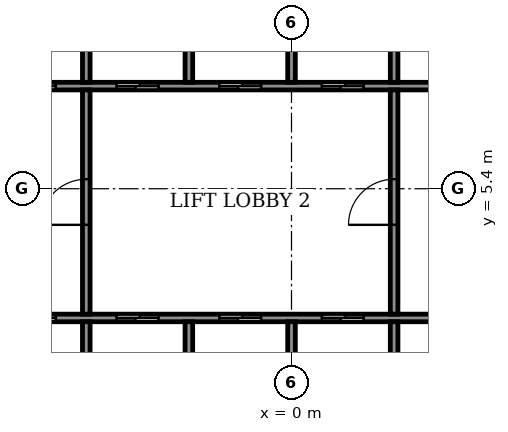
"""IFC4 building model, lengths in metres.
Left out: names, types, materials, properties, quantities, classifications, styles, units other than length and angle.
Written with IfcOpenShell. Run it as: python <this file> out.ifc"""

import sys

from ifc_helpers import new_model, si_unit, direction, frame, frame_2d, origin, place, context, subcontext, project, spatial, rectangle, extrude, element, fill, save


model = new_model("IFC4")
c1 = context("Model", 3, precision=1e-05, world=origin(), true_north=direction((0.0, 1.0)))
c2 = subcontext(c1, "Body", "Model", "MODEL_VIEW")
j1 = project(units=[si_unit("LENGTHUNIT", "METRE"), si_unit("PLANEANGLEUNIT", "RADIAN")], contexts=[c1])
p1 = place(None, origin())
s1 = spatial("IfcSite", under=j1, at=p1, CompositionType="ELEMENT")
p2 = place(p1, origin())
s2 = spatial("IfcBuilding", under=s1, at=p2, CompositionType="ELEMENT")
p3 = place(p2, frame((0.0, 0.0, 29.5)))
s3 = spatial("IfcBuildingStorey", under=s2, at=p3, CompositionType="ELEMENT", Elevation=29.5)
p4 = place(p3, frame((-10.9, 2.0, 0.0), z_axis=(0.0, 0.0, 1.0), x_axis=(1.0, 0.0, 0.0)))
e1 = element("IfcWall", 1, at=p4, inside=s3, PredefinedType="SHEAR", context=c2, shape_type="SweptSolid", body=[
    extrude(rectangle(XDim=21.8, YDim=0.2, at=frame_2d((10.9, 0.0))), origin(), (0.0, 0.0, 1.0), 4.05),
])
p5 = place(p4, frame((0.9, 0.0, 0.0)))
e2 = element("IfcOpeningElement", 2, at=p5, cuts=e1, PredefinedType="OPENING", context=c2, shape_type="SweptSolid", body=[
    extrude(rectangle(XDim=1.1, YDim=2.1, at=frame_2d((0.55, 1.05))), frame((0.0, 0.11, 0.0), z_axis=(0.0, -1.0, 0.0), x_axis=(1.0, 0.0, 0.0)), (0.0, 0.0, 1.0), 0.22),
])
p6 = place(p4, frame((3.6, 0.0, 0.0)))
e3 = element("IfcOpeningElement", 3, at=p6, cuts=e1, PredefinedType="OPENING", context=c2, shape_type="SweptSolid", body=[
    extrude(rectangle(XDim=1.1, YDim=2.1, at=frame_2d((0.55, 1.05))), frame((0.0, 0.11, 0.0), z_axis=(0.0, -1.0, 0.0), x_axis=(1.0, 0.0, 0.0)), (0.0, 0.0, 1.0), 0.22),
])
p7 = place(p4, frame((6.3, 0.0, 0.0)))
e4 = element("IfcOpeningElement", 4, at=p7, cuts=e1, PredefinedType="OPENING", context=c2, shape_type="SweptSolid", body=[
    extrude(rectangle(XDim=1.1, YDim=2.1, at=frame_2d((0.55, 1.05))), frame((0.0, 0.11, 0.0), z_axis=(0.0, -1.0, 0.0), x_axis=(1.0, 0.0, 0.0)), (0.0, 0.0, 1.0), 0.22),
])
p8 = place(p4, frame((9.0, 0.0, 0.0)))
e5 = element("IfcOpeningElement", 5, at=p8, cuts=e1, PredefinedType="OPENING", context=c2, shape_type="SweptSolid", body=[
    extrude(rectangle(XDim=1.1, YDim=2.1, at=frame_2d((0.55, 1.05))), frame((0.0, 0.11, 0.0), z_axis=(0.0, -1.0, 0.0), x_axis=(1.0, 0.0, 0.0)), (0.0, 0.0, 1.0), 0.22),
])
p9 = place(p4, frame((11.7, 0.0, 0.0)))
e6 = element("IfcOpeningElement", 6, at=p9, cuts=e1, PredefinedType="OPENING", context=c2, shape_type="SweptSolid", body=[
    extrude(rectangle(XDim=1.1, YDim=2.1, at=frame_2d((0.55, 1.05))), frame((0.0, 0.11, 0.0), z_axis=(0.0, -1.0, 0.0), x_axis=(1.0, 0.0, 0.0)), (0.0, 0.0, 1.0), 0.22),
])
p10 = place(p4, frame((15.175, 0.0, 0.0)))
e7 = element("IfcOpeningElement", 7, at=p10, cuts=e1, PredefinedType="OPENING", context=c2, shape_type="SweptSolid", body=[
    extrude(rectangle(XDim=0.9, YDim=2.1, at=frame_2d((0.45, 1.05))), frame((0.0, 0.11, 0.0), z_axis=(0.0, -1.0, 0.0), x_axis=(1.0, 0.0, 0.0)), (0.0, 0.0, 1.0), 0.22),
])
p11 = place(p4, frame((19.225, 0.0, 0.0)))
e8 = element("IfcOpeningElement", 8, at=p11, cuts=e1, PredefinedType="OPENING", context=c2, shape_type="SweptSolid", body=[
    extrude(rectangle(XDim=0.9, YDim=2.1, at=frame_2d((0.45, 1.05))), frame((0.0, 0.11, 0.0), z_axis=(0.0, -1.0, 0.0), x_axis=(1.0, 0.0, 0.0)), (0.0, 0.0, 1.0), 0.22),
])
p12 = place(p3, frame((-10.9, 8.1, 0.0), z_axis=(0.0, 0.0, 1.0), x_axis=(1.0, 0.0, 0.0)))
e9 = element("IfcWall", 9, at=p12, inside=s3, PredefinedType="SHEAR", context=c2, shape_type="SweptSolid", body=[
    extrude(rectangle(XDim=21.8, YDim=0.2, at=frame_2d((10.9, 0.0))), origin(), (0.0, 0.0, 1.0), 4.05),
])
p13 = place(p12, frame((0.9, 0.0, 0.0)))
e10 = element("IfcOpeningElement", 10, at=p13, cuts=e9, PredefinedType="OPENING", context=c2, shape_type="SweptSolid", body=[
    extrude(rectangle(XDim=1.1, YDim=2.1, at=frame_2d((0.55, 1.05))), frame((0.0, 0.11, 0.0), z_axis=(0.0, -1.0, 0.0), x_axis=(1.0, 0.0, 0.0)), (0.0, 0.0, 1.0), 0.22),
])
p14 = place(p12, frame((3.6, 0.0, 0.0)))
e11 = element("IfcOpeningElement", 11, at=p14, cuts=e9, PredefinedType="OPENING", context=c2, shape_type="SweptSolid", body=[
    extrude(rectangle(XDim=1.1, YDim=2.1, at=frame_2d((0.55, 1.05))), frame((0.0, 0.11, 0.0), z_axis=(0.0, -1.0, 0.0), x_axis=(1.0, 0.0, 0.0)), (0.0, 0.0, 1.0), 0.22),
])
p15 = place(p12, frame((6.3, 0.0, 0.0)))
e12 = element("IfcOpeningElement", 12, at=p15, cuts=e9, PredefinedType="OPENING", context=c2, shape_type="SweptSolid", body=[
    extrude(rectangle(XDim=1.1, YDim=2.1, at=frame_2d((0.55, 1.05))), frame((0.0, 0.11, 0.0), z_axis=(0.0, -1.0, 0.0), x_axis=(1.0, 0.0, 0.0)), (0.0, 0.0, 1.0), 0.22),
])
p16 = place(p12, frame((9.0, 0.0, 0.0)))
e13 = element("IfcOpeningElement", 13, at=p16, cuts=e9, PredefinedType="OPENING", context=c2, shape_type="SweptSolid", body=[
    extrude(rectangle(XDim=1.1, YDim=2.1, at=frame_2d((0.55, 1.05))), frame((0.0, 0.11, 0.0), z_axis=(0.0, -1.0, 0.0), x_axis=(1.0, 0.0, 0.0)), (0.0, 0.0, 1.0), 0.22),
])
p17 = place(p12, frame((11.7, 0.0, 0.0)))
e14 = element("IfcOpeningElement", 14, at=p17, cuts=e9, PredefinedType="OPENING", context=c2, shape_type="SweptSolid", body=[
    extrude(rectangle(XDim=1.1, YDim=2.1, at=frame_2d((0.55, 1.05))), frame((0.0, 0.11, 0.0), z_axis=(0.0, -1.0, 0.0), x_axis=(1.0, 0.0, 0.0)), (0.0, 0.0, 1.0), 0.22),
])
p18 = place(p12, frame((15.175, 0.0, 0.0)))
e15 = element("IfcOpeningElement", 15, at=p18, cuts=e9, PredefinedType="OPENING", context=c2, shape_type="SweptSolid", body=[
    extrude(rectangle(XDim=0.9, YDim=2.1, at=frame_2d((0.45, 1.05))), frame((0.0, 0.11, 0.0), z_axis=(0.0, -1.0, 0.0), x_axis=(1.0, 0.0, 0.0)), (0.0, 0.0, 1.0), 0.22),
])
p19 = place(p12, frame((19.225, 0.0, 0.0)))
e16 = element("IfcOpeningElement", 16, at=p19, cuts=e9, PredefinedType="OPENING", context=c2, shape_type="SweptSolid", body=[
    extrude(rectangle(XDim=0.9, YDim=2.1, at=frame_2d((0.45, 1.05))), frame((0.0, 0.11, 0.0), z_axis=(0.0, -1.0, 0.0), x_axis=(1.0, 0.0, 0.0)), (0.0, 0.0, 1.0), 0.22),
])
for number, where, z_axis, x_axis in (
    (17, (-5.4, -0.6, 0.0), (0.0, 0.0, 1.0), (0.0, 1.0, 0.0)),
    (18, (-2.7, -0.6, 0.0), (0.0, 0.0, 1.0), (0.0, 1.0, 0.0)),
    (19, (0.0, -0.6, 0.0), (0.0, 0.0, 1.0), (0.0, 1.0, 0.0)),
    (20, (2.7, -0.6, 0.0), (0.0, 0.0, 1.0), (0.0, 1.0, 0.0)),
):
    element("IfcWall", number, at=place(p3, frame(where, z_axis=z_axis, x_axis=x_axis)), inside=s3, PredefinedType="SHEAR", context=c2, shape_type="SweptSolid", body=[
        extrude(rectangle(XDim=2.5, YDim=0.2, at=frame_2d((1.25, 0.0))), origin(), (0.0, 0.0, 1.0), 4.05),
    ])
for number, where, z_axis, x_axis in (
    (21, (-5.4, 8.2, 0.0), (0.0, 0.0, 1.0), (0.0, 1.0, 0.0)),
    (22, (-2.7, 8.2, 0.0), (0.0, 0.0, 1.0), (0.0, 1.0, 0.0)),
    (23, (0.0, 8.2, 0.0), (0.0, 0.0, 1.0), (0.0, 1.0, 0.0)),
    (24, (2.7, 8.2, 0.0), (0.0, 0.0, 1.0), (0.0, 1.0, 0.0)),
):
    element("IfcWall", number, at=place(p3, frame(where, z_axis=z_axis, x_axis=x_axis)), inside=s3, PredefinedType="SHEAR", context=c2, shape_type="SweptSolid", body=[
        extrude(rectangle(XDim=2.6, YDim=0.2, at=frame_2d((1.3, 0.0))), origin(), (0.0, 0.0, 1.0), 4.05),
    ])
p20 = place(p3, frame((-5.4, 2.1, 0.0), z_axis=(0.0, 0.0, 1.0), x_axis=(0.0, 1.0, 0.0)))
e25 = element("IfcWall", 25, at=p20, inside=s3, PredefinedType="STANDARD", context=c2, shape_type="SweptSolid", body=[
    extrude(rectangle(XDim=5.9, YDim=0.2, at=frame_2d((2.95, 0.0))), origin(), (0.0, 0.0, 1.0), 4.05),
])
p21 = place(p20, frame((2.35, 0.0, 0.0)))
e26 = element("IfcOpeningElement", 26, at=p21, cuts=e25, PredefinedType="OPENING", context=c2, shape_type="SweptSolid", body=[
    extrude(rectangle(XDim=1.2, YDim=2.1, at=frame_2d((0.6, 1.05))), frame((0.0, 0.11, 0.0), z_axis=(0.0, -1.0, 0.0), x_axis=(1.0, 0.0, 0.0)), (0.0, 0.0, 1.0), 0.22),
])
p22 = place(p3, frame((2.7, 2.1, 0.0), z_axis=(0.0, 0.0, 1.0), x_axis=(0.0, 1.0, 0.0)))
e27 = element("IfcWall", 27, at=p22, inside=s3, PredefinedType="STANDARD", context=c2, shape_type="SweptSolid", body=[
    extrude(rectangle(XDim=5.9, YDim=0.2, at=frame_2d((2.95, 0.0))), origin(), (0.0, 0.0, 1.0), 4.05),
])
p23 = place(p22, frame((2.35, 0.0, 0.0)))
e28 = element("IfcOpeningElement", 28, at=p23, cuts=e27, PredefinedType="OPENING", context=c2, shape_type="SweptSolid", body=[
    extrude(rectangle(XDim=1.2, YDim=2.1, at=frame_2d((0.6, 1.05))), frame((0.0, 0.11, 0.0), z_axis=(0.0, -1.0, 0.0), x_axis=(1.0, 0.0, 0.0)), (0.0, 0.0, 1.0), 0.22),
])
p24 = place(p6, origin())
e29 = element("IfcDoor", 29, at=p24, inside=s3, OperationType="SLIDING_TO_LEFT", PredefinedType="DOOR", context=c2, shape_type="SweptSolid", body=[
    extrude(rectangle(XDim=1.1, YDim=2.1, at=frame_2d((0.55, 1.05))), frame((0.0, 0.025, 0.0), z_axis=(0.0, -1.0, 0.0), x_axis=(1.0, 0.0, 0.0)), (0.0, 0.0, 1.0), 0.05),
])
fill(e3, e29)
p25 = place(p7, origin())
e30 = element("IfcDoor", 30, at=p25, inside=s3, OperationType="SLIDING_TO_LEFT", PredefinedType="DOOR", context=c2, shape_type="SweptSolid", body=[
    extrude(rectangle(XDim=1.1, YDim=2.1, at=frame_2d((0.55, 1.05))), frame((0.0, 0.025, 0.0), z_axis=(0.0, -1.0, 0.0), x_axis=(1.0, 0.0, 0.0)), (0.0, 0.0, 1.0), 0.05),
])
fill(e4, e30)
p26 = place(p8, origin())
e31 = element("IfcDoor", 31, at=p26, inside=s3, OperationType="SLIDING_TO_LEFT", PredefinedType="DOOR", context=c2, shape_type="SweptSolid", body=[
    extrude(rectangle(XDim=1.1, YDim=2.1, at=frame_2d((0.55, 1.05))), frame((0.0, 0.025, 0.0), z_axis=(0.0, -1.0, 0.0), x_axis=(1.0, 0.0, 0.0)), (0.0, 0.0, 1.0), 0.05),
])
fill(e5, e31)
p27 = place(p9, origin())
e32 = element("IfcDoor", 32, at=p27, inside=s3, OperationType="SLIDING_TO_LEFT", PredefinedType="DOOR", context=c2, shape_type="SweptSolid", body=[
    extrude(rectangle(XDim=1.1, YDim=2.1, at=frame_2d((0.55, 1.05))), frame((0.0, 0.025, 0.0), z_axis=(0.0, -1.0, 0.0), x_axis=(1.0, 0.0, 0.0)), (0.0, 0.0, 1.0), 0.05),
])
fill(e6, e32)
p28 = place(p14, origin())
e33 = element("IfcDoor", 33, at=p28, inside=s3, OperationType="SLIDING_TO_LEFT", PredefinedType="DOOR", context=c2, shape_type="SweptSolid", body=[
    extrude(rectangle(XDim=1.1, YDim=2.1, at=frame_2d((0.55, 1.05))), frame((0.0, 0.025, 0.0), z_axis=(0.0, -1.0, 0.0), x_axis=(1.0, 0.0, 0.0)), (0.0, 0.0, 1.0), 0.05),
])
fill(e11, e33)
p29 = place(p15, origin())
e34 = element("IfcDoor", 34, at=p29, inside=s3, OperationType="SLIDING_TO_LEFT", PredefinedType="DOOR", context=c2, shape_type="SweptSolid", body=[
    extrude(rectangle(XDim=1.1, YDim=2.1, at=frame_2d((0.55, 1.05))), frame((0.0, 0.025, 0.0), z_axis=(0.0, -1.0, 0.0), x_axis=(1.0, 0.0, 0.0)), (0.0, 0.0, 1.0), 0.05),
])
fill(e12, e34)
p30 = place(p16, origin())
e35 = element("IfcDoor", 35, at=p30, inside=s3, OperationType="SLIDING_TO_LEFT", PredefinedType="DOOR", context=c2, shape_type="SweptSolid", body=[
    extrude(rectangle(XDim=1.1, YDim=2.1, at=frame_2d((0.55, 1.05))), frame((0.0, 0.025, 0.0), z_axis=(0.0, -1.0, 0.0), x_axis=(1.0, 0.0, 0.0)), (0.0, 0.0, 1.0), 0.05),
])
fill(e13, e35)
p31 = place(p17, origin())
e36 = element("IfcDoor", 36, at=p31, inside=s3, OperationType="SLIDING_TO_LEFT", PredefinedType="DOOR", context=c2, shape_type="SweptSolid", body=[
    extrude(rectangle(XDim=1.1, YDim=2.1, at=frame_2d((0.55, 1.05))), frame((0.0, 0.025, 0.0), z_axis=(0.0, -1.0, 0.0), x_axis=(1.0, 0.0, 0.0)), (0.0, 0.0, 1.0), 0.05),
])
fill(e14, e36)
p32 = place(p21, origin())
e37 = element("IfcDoor", 37, at=p32, inside=s3, OperationType="SINGLE_SWING_LEFT", PredefinedType="DOOR", context=c2, shape_type="SweptSolid", body=[
    extrude(rectangle(XDim=1.2, YDim=2.1, at=frame_2d((0.6, 1.05))), frame((0.0, 0.025, 0.0), z_axis=(0.0, -1.0, 0.0), x_axis=(1.0, 0.0, 0.0)), (0.0, 0.0, 1.0), 0.05),
])
fill(e26, e37)
p33 = place(p23, origin())
e38 = element("IfcDoor", 38, at=p33, inside=s3, OperationType="SINGLE_SWING_LEFT", PredefinedType="DOOR", context=c2, shape_type="SweptSolid", body=[
    extrude(rectangle(XDim=1.2, YDim=2.1, at=frame_2d((0.6, 1.05))), frame((0.0, 0.025, 0.0), z_axis=(0.0, -1.0, 0.0), x_axis=(1.0, 0.0, 0.0)), (0.0, 0.0, 1.0), 0.05),
])
fill(e28, e38)
save(model, sys.argv[1])
